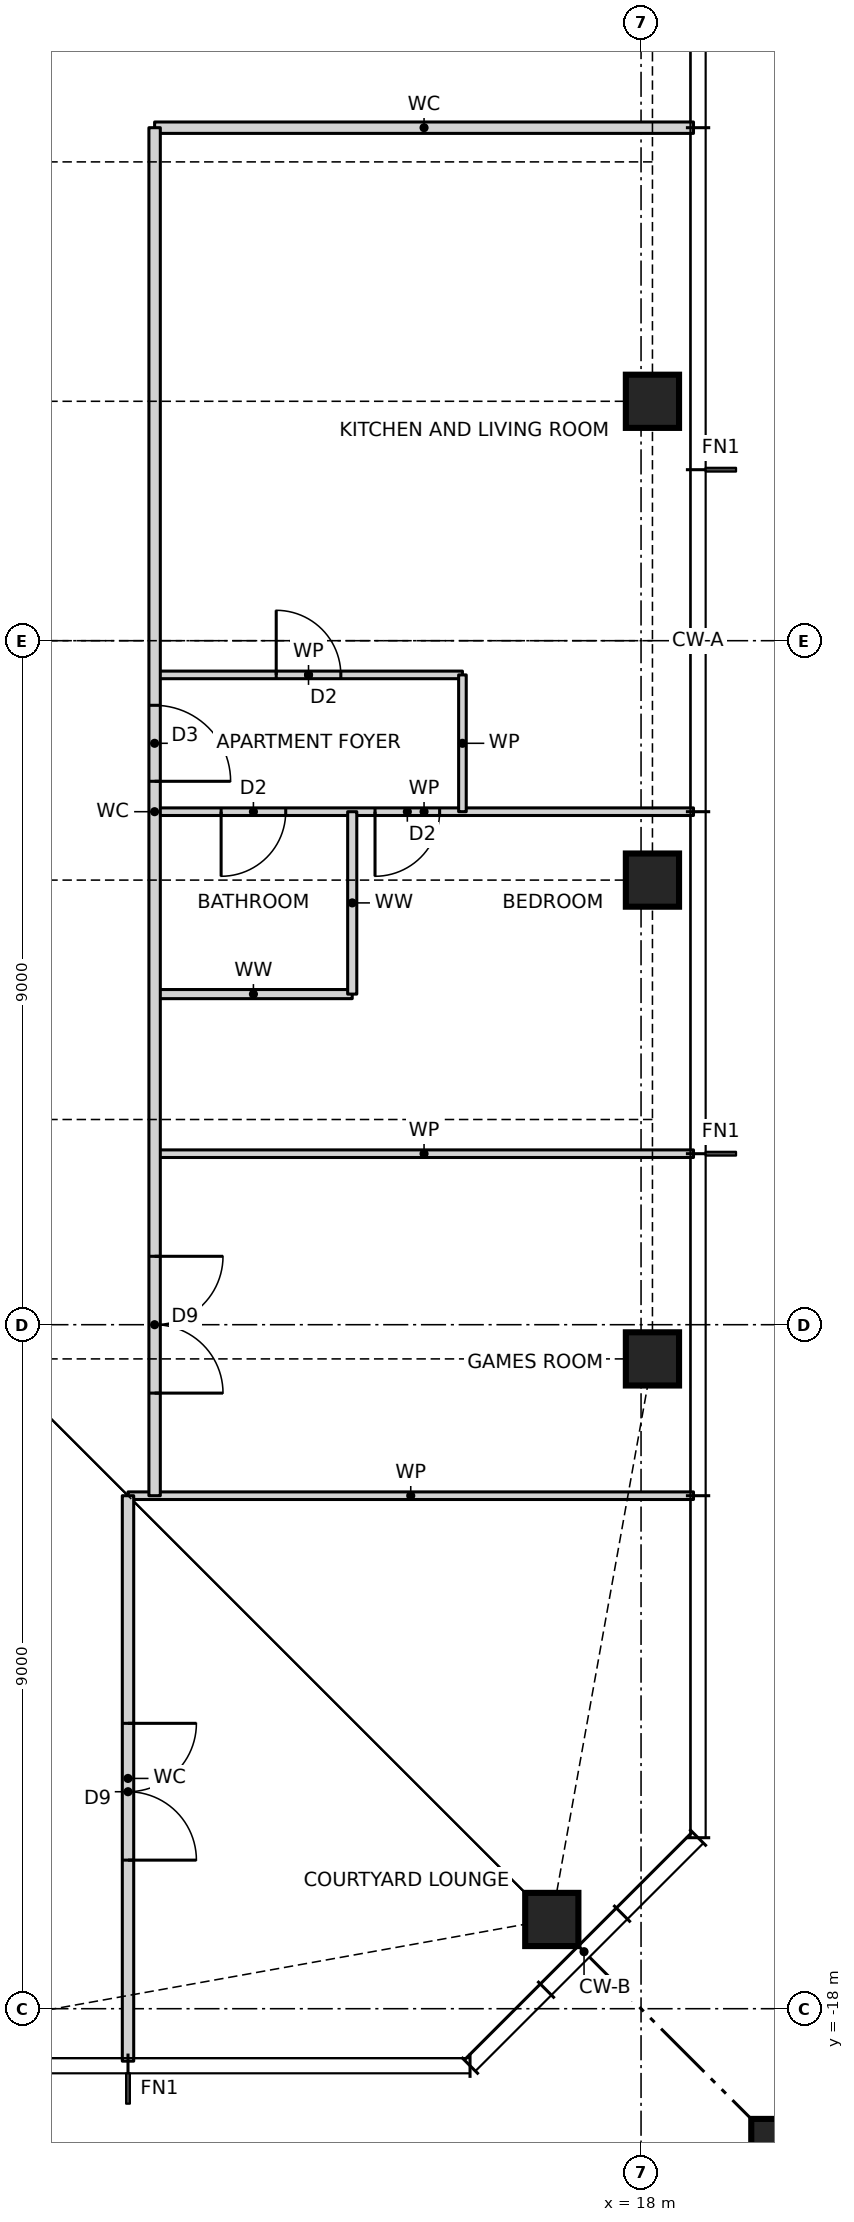
"""IFC4 building model, lengths in metres.
Left out: names, types, materials, properties, quantities, classifications, styles, units other than length and angle.
Written with IfcOpenShell. Run it as: python <this file> out.ifc"""

import sys

from ifc_helpers import new_model, si_unit, direction, frame, frame_2d, origin, origin_2d, place, context, subcontext, project, spatial, rectangle, hollow_rectangle, i_section, extrude, element, fill, save


model = new_model("IFC4")
c1 = context("Model", 3, precision=1e-05, world=origin(), true_north=direction((0.0, 1.0)))
c2 = subcontext(c1, "Body", "Model", "MODEL_VIEW")
j1 = project(units=[si_unit("LENGTHUNIT", "METRE"), si_unit("PLANEANGLEUNIT", "RADIAN")], contexts=[c1])
p1 = place(None, origin())
s1 = spatial("IfcSite", under=j1, at=p1, CompositionType="ELEMENT")
p2 = place(p1, origin())
s2 = spatial("IfcBuilding", under=s1, at=p2, CompositionType="ELEMENT")
p3 = place(p2, frame((0.0, 0.0, 188.0)))
s3 = spatial("IfcBuildingStorey", under=s2, at=p3, CompositionType="ELEMENT", Elevation=188.0)
for number, where, z_axis, x_axis in (
    (1, (16.826, -16.826, 0.0), (0.0, 0.0, 1.0), (1.0, 0.0, 0.0)),
    (2, (18.15, -9.45, 0.0), (0.0, 0.0, 1.0), (1.0, 0.0, 0.0)),
    (3, (18.15, -3.15, 0.0), (0.0, 0.0, 1.0), (1.0, 0.0, 0.0)),
    (4, (18.15, 3.15, 0.0), (0.0, 0.0, 1.0), (1.0, 0.0, 0.0)),
):
    element("IfcColumn", number, at=place(p3, frame(where, z_axis=z_axis, x_axis=x_axis)), inside=s3, PredefinedType="COLUMN", context=c2, shape_type="SweptSolid", body=[
        extrude(hollow_rectangle(XDim=0.7, YDim=0.7, WallThickness=0.06, at=origin_2d()), origin(), (0.0, 0.0, 1.0), 3.5),
    ])
p4 = place(p3, frame((21.65, -21.65, 0.0), z_axis=(0.0, 0.0, 1.0), x_axis=(1.0, 0.0, 0.0)))
e5 = element("IfcColumn", 5, at=p4, inside=s3, PredefinedType="COLUMN", context=c2, shape_type="SweptSolid", body=[
    extrude(rectangle(XDim=4.4, YDim=4.4, at=origin_2d()), origin(), (0.0, 0.0, 1.0), 3.5),
    extrude(i_section(OverallWidth=0.478, OverallDepth=0.599, WebThickness=0.1, FlangeThickness=0.14, at=origin_2d()), origin(), (0.0, 0.0, 1.0), 3.5),
])
p5 = place(p3, frame((11.25, -11.25, 0.0), z_axis=(0.0, 0.0, 1.0), x_axis=(1.0, 0.0, 0.0)))
e6 = element("IfcWall", 6, at=p5, inside=s3, PredefinedType="PARTITIONING", context=c2, shape_type="SweptSolid", body=[
    extrude(rectangle(XDim=7.44, YDim=0.1, at=frame_2d((3.72, 0.0))), origin(), (0.0, 0.0, 1.0), 3.27),
])
p6 = place(p3, frame((11.6, -6.75, 0.0), z_axis=(0.0, 0.0, 1.0), x_axis=(1.0, 0.0, 0.0)))
e7 = element("IfcWall", 7, at=p6, inside=s3, PredefinedType="PARTITIONING", context=c2, shape_type="SweptSolid", body=[
    extrude(rectangle(XDim=7.09, YDim=0.1, at=frame_2d((3.545, 0.0))), origin(), (0.0, 0.0, 1.0), 3.27),
])
p7 = place(p3, frame((11.6, -4.65, 0.0), z_axis=(0.0, 0.0, 1.0), x_axis=(1.0, 0.0, 0.0)))
e8 = element("IfcWall", 8, at=p7, inside=s3, PredefinedType="PARTITIONING", context=c2, shape_type="SweptSolid", body=[
    extrude(rectangle(XDim=2.6, YDim=0.12, at=frame_2d((1.3, 0.0))), origin(), (0.0, 0.0, 1.0), 3.27),
])
p8 = place(p3, frame((11.6, -2.25, 0.0), z_axis=(0.0, 0.0, 1.0), x_axis=(1.0, 0.0, 0.0)))
e9 = element("IfcWall", 9, at=p8, inside=s3, PredefinedType="PARTITIONING", context=c2, shape_type="SweptSolid", body=[
    extrude(rectangle(XDim=7.09, YDim=0.1, at=frame_2d((3.545, 0.0))), origin(), (0.0, 0.0, 1.0), 3.27),
])
p9 = place(p8, frame((2.9, 0.0, 0.0)))
e10 = element("IfcOpeningElement", 10, at=p9, cuts=e9, PredefinedType="OPENING", context=c2, shape_type="SweptSolid", body=[
    extrude(rectangle(XDim=0.85, YDim=2.1, at=frame_2d((0.425, 1.05))), frame((0.0, 0.06, 0.0), z_axis=(0.0, -1.0, 0.0), x_axis=(1.0, 0.0, 0.0)), (0.0, 0.0, 1.0), 0.12),
])
p10 = place(p8, frame((0.875, 0.0, 0.0)))
e11 = element("IfcOpeningElement", 11, at=p10, cuts=e9, PredefinedType="OPENING", context=c2, shape_type="SweptSolid", body=[
    extrude(rectangle(XDim=0.85, YDim=2.1, at=frame_2d((0.425, 1.05))), frame((0.0, 0.06, 0.0), z_axis=(0.0, -1.0, 0.0), x_axis=(1.0, 0.0, 0.0)), (0.0, 0.0, 1.0), 0.12),
])
p11 = place(p3, frame((11.6, -0.45, 0.0), z_axis=(0.0, 0.0, 1.0), x_axis=(1.0, 0.0, 0.0)))
e12 = element("IfcWall", 12, at=p11, inside=s3, PredefinedType="PARTITIONING", context=c2, shape_type="SweptSolid", body=[
    extrude(rectangle(XDim=4.05, YDim=0.1, at=frame_2d((2.025, 0.0))), origin(), (0.0, 0.0, 1.0), 3.27),
])
p12 = place(p11, frame((1.6, 0.0, 0.0)))
e13 = element("IfcOpeningElement", 13, at=p12, cuts=e12, PredefinedType="OPENING", context=c2, shape_type="SweptSolid", body=[
    extrude(rectangle(XDim=0.85, YDim=2.1, at=frame_2d((0.425, 1.05))), frame((0.0, 0.06, 0.0), z_axis=(0.0, -1.0, 0.0), x_axis=(1.0, 0.0, 0.0)), (0.0, 0.0, 1.0), 0.12),
])
p13 = place(p3, frame((11.6, 6.75, 0.0), z_axis=(0.0, 0.0, 1.0), x_axis=(1.0, 0.0, 0.0)))
e14 = element("IfcWall", 14, at=p13, inside=s3, PredefinedType="PARTITIONING", context=c2, shape_type="SweptSolid", body=[
    extrude(rectangle(XDim=7.09, YDim=0.15, at=frame_2d((3.545, 0.0))), origin(), (0.0, 0.0, 1.0), 3.27),
])
p14 = place(p3, frame((15.65, -2.25, 0.0), z_axis=(0.0, 0.0, 1.0), x_axis=(0.0, 1.0, 0.0)))
e15 = element("IfcWall", 15, at=p14, inside=s3, PredefinedType="PARTITIONING", context=c2, shape_type="SweptSolid", body=[
    extrude(rectangle(XDim=1.8, YDim=0.1, at=frame_2d((0.9, 0.0))), origin(), (0.0, 0.0, 1.0), 3.27),
])
p15 = place(p3, frame((14.2, -4.65, 0.0), z_axis=(0.0, 0.0, 1.0), x_axis=(0.0, 1.0, 0.0)))
e16 = element("IfcWall", 16, at=p15, inside=s3, PredefinedType="PARTITIONING", context=c2, shape_type="SweptSolid", body=[
    extrude(rectangle(XDim=2.4, YDim=0.12, at=frame_2d((1.2, 0.0))), origin(), (0.0, 0.0, 1.0), 3.27),
])
p16 = place(p3, frame((11.6, -11.25, 0.0), z_axis=(0.0, 0.0, 1.0), x_axis=(0.0, 1.0, 0.0)))
e17 = element("IfcWall", 17, at=p16, inside=s3, PredefinedType="PARTITIONING", context=c2, shape_type="SweptSolid", body=[
    extrude(rectangle(XDim=18.0, YDim=0.15, at=frame_2d((9.0, 0.0))), origin(), (0.0, 0.0, 1.0), 3.27),
])
p17 = place(p16, frame((1.35, 0.0, 0.0)))
e18 = element("IfcOpeningElement", 18, at=p17, cuts=e17, PredefinedType="OPENING", context=c2, shape_type="SweptSolid", body=[
    extrude(rectangle(XDim=1.8, YDim=2.1, at=frame_2d((0.9, 1.05))), frame((0.0, 0.085, 0.0), z_axis=(0.0, -1.0, 0.0), x_axis=(1.0, 0.0, 0.0)), (0.0, 0.0, 1.0), 0.17),
])
p18 = place(p16, frame((9.4, 0.0, 0.0)))
e19 = element("IfcOpeningElement", 19, at=p18, cuts=e17, PredefinedType="OPENING", context=c2, shape_type="SweptSolid", body=[
    extrude(rectangle(XDim=1.0, YDim=2.1, at=frame_2d((0.5, 1.05))), frame((0.0, 0.085, 0.0), z_axis=(0.0, -1.0, 0.0), x_axis=(1.0, 0.0, 0.0)), (0.0, 0.0, 1.0), 0.17),
])
p19 = place(p3, frame((11.25, -18.69, 0.0), z_axis=(0.0, 0.0, 1.0), x_axis=(0.0, 1.0, 0.0)))
e20 = element("IfcWall", 20, at=p19, inside=s3, PredefinedType="PARTITIONING", context=c2, shape_type="SweptSolid", body=[
    extrude(rectangle(XDim=7.44, YDim=0.15, at=frame_2d((3.72, 0.0))), origin(), (0.0, 0.0, 1.0), 3.27),
])
p20 = place(p19, frame((2.645, 0.0, 0.0)))
e21 = element("IfcOpeningElement", 21, at=p20, cuts=e20, PredefinedType="OPENING", context=c2, shape_type="SweptSolid", body=[
    extrude(rectangle(XDim=1.8, YDim=2.1, at=frame_2d((0.9, 1.05))), frame((0.0, 0.085, 0.0), z_axis=(0.0, -1.0, 0.0), x_axis=(1.0, 0.0, 0.0)), (0.0, 0.0, 1.0), 0.17),
])
p21 = place(p17, frame((1.8, 0.0, 0.0), z_axis=(0.0, 0.0, 1.0), x_axis=(-1.0, 0.0, 0.0)))
e22 = element("IfcDoor", 22, at=p21, inside=s3, OperationType="DOUBLE_DOOR_SINGLE_SWING", PredefinedType="DOOR", context=c2, shape_type="SweptSolid", body=[
    extrude(rectangle(XDim=1.8, YDim=2.1, at=frame_2d((0.9, 1.05))), frame((0.0, 0.025, 0.0), z_axis=(0.0, -1.0, 0.0), x_axis=(1.0, 0.0, 0.0)), (0.0, 0.0, 1.0), 0.05),
])
fill(e18, e22)
p22 = place(p18, frame((1.0, 0.0, 0.0), z_axis=(0.0, 0.0, 1.0), x_axis=(-1.0, 0.0, 0.0)))
e23 = element("IfcDoor", 23, at=p22, inside=s3, OperationType="SINGLE_SWING_RIGHT", PredefinedType="DOOR", context=c2, shape_type="SweptSolid", body=[
    extrude(rectangle(XDim=1.0, YDim=2.1, at=frame_2d((0.5, 1.05))), frame((0.0, 0.025, 0.0), z_axis=(0.0, -1.0, 0.0), x_axis=(1.0, 0.0, 0.0)), (0.0, 0.0, 1.0), 0.05),
])
fill(e19, e23)
p23 = place(p12, origin())
e24 = element("IfcDoor", 24, at=p23, inside=s3, OperationType="SINGLE_SWING_LEFT", PredefinedType="DOOR", context=c2, shape_type="SweptSolid", body=[
    extrude(rectangle(XDim=0.85, YDim=2.1, at=frame_2d((0.425, 1.05))), frame((0.0, 0.025, 0.0), z_axis=(0.0, -1.0, 0.0), x_axis=(1.0, 0.0, 0.0)), (0.0, 0.0, 1.0), 0.05),
])
fill(e13, e24)
p24 = place(p9, frame((0.85, 0.0, 0.0), z_axis=(0.0, 0.0, 1.0), x_axis=(-1.0, 0.0, 0.0)))
e25 = element("IfcDoor", 25, at=p24, inside=s3, OperationType="SINGLE_SWING_RIGHT", PredefinedType="DOOR", context=c2, shape_type="SweptSolid", body=[
    extrude(rectangle(XDim=0.85, YDim=2.1, at=frame_2d((0.425, 1.05))), frame((0.0, 0.025, 0.0), z_axis=(0.0, -1.0, 0.0), x_axis=(1.0, 0.0, 0.0)), (0.0, 0.0, 1.0), 0.05),
])
fill(e10, e25)
p25 = place(p10, frame((0.85, 0.0, 0.0), z_axis=(0.0, 0.0, 1.0), x_axis=(-1.0, 0.0, 0.0)))
e26 = element("IfcDoor", 26, at=p25, inside=s3, OperationType="SINGLE_SWING_RIGHT", PredefinedType="DOOR", context=c2, shape_type="SweptSolid", body=[
    extrude(rectangle(XDim=0.85, YDim=2.1, at=frame_2d((0.425, 1.05))), frame((0.0, 0.025, 0.0), z_axis=(0.0, -1.0, 0.0), x_axis=(1.0, 0.0, 0.0)), (0.0, 0.0, 1.0), 0.05),
])
fill(e11, e26)
p26 = place(p20, frame((1.8, 0.0, 0.0), z_axis=(0.0, 0.0, 1.0), x_axis=(-1.0, 0.0, 0.0)))
e27 = element("IfcDoor", 27, at=p26, inside=s3, OperationType="DOUBLE_DOOR_SINGLE_SWING", PredefinedType="DOOR", context=c2, shape_type="SweptSolid", body=[
    extrude(rectangle(XDim=1.8, YDim=2.1, at=frame_2d((0.9, 1.05))), frame((0.0, 0.025, 0.0), z_axis=(0.0, -1.0, 0.0), x_axis=(1.0, 0.0, 0.0)), (0.0, 0.0, 1.0), 0.05),
])
fill(e21, e27)
save(model, sys.argv[1])
